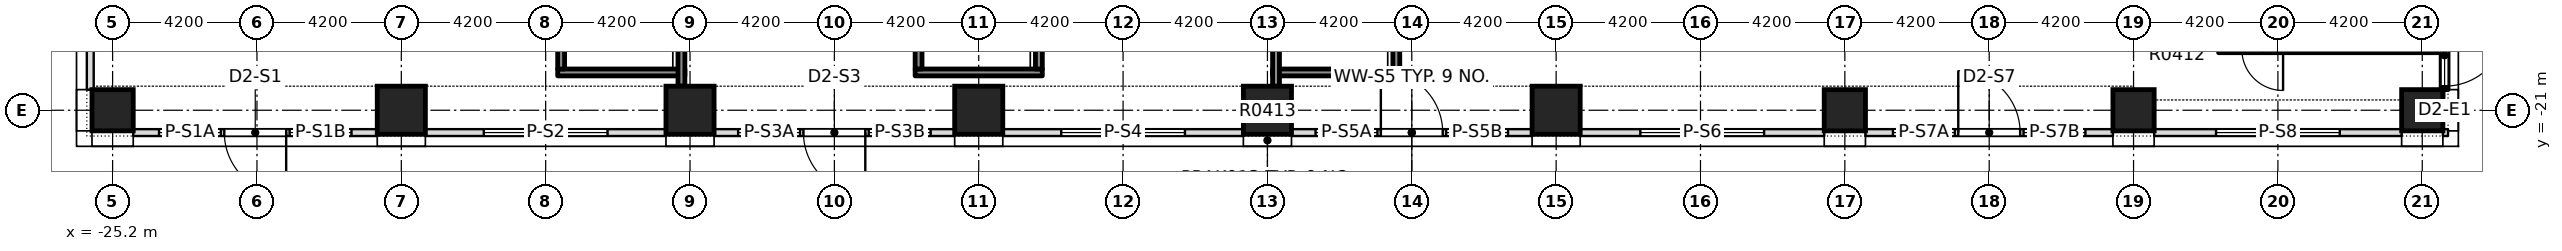
"""IFC4 building model, lengths in metres.
Left out: names, types, materials, properties, quantities, classifications, styles, units other than length and angle.
Written with IfcOpenShell. Run it as: python <this file> out.ifc"""

import sys

from ifc_helpers import new_model, si_unit, direction, frame, frame_2d, origin, origin_2d, place, context, subcontext, project, spatial, rectangle, extrude, element, fill, save


model = new_model("IFC4")
c1 = context("Model", 3, precision=1e-05, world=origin(), true_north=direction((0.0, 1.0)))
c2 = subcontext(c1, "Body", "Model", "MODEL_VIEW")
j1 = project(units=[si_unit("LENGTHUNIT", "METRE"), si_unit("PLANEANGLEUNIT", "RADIAN")], contexts=[c1])
p1 = place(None, origin())
s1 = spatial("IfcSite", under=j1, at=p1, CompositionType="ELEMENT")
p2 = place(p1, origin())
s2 = spatial("IfcBuilding", under=s1, at=p2, CompositionType="ELEMENT")
p3 = place(p2, frame((0.0, 0.0, 25.0)))
s3 = spatial("IfcBuildingStorey", under=s2, at=p3, CompositionType="ELEMENT", Elevation=25.0)
for number, where, z_axis, x_axis in (
    (1, (-16.8, -21.0, -0.4), (0.0, 0.0, 1.0), (1.0, 0.0, 0.0)),
    (2, (-8.4, -21.0, -0.4), (0.0, 0.0, 1.0), (1.0, 0.0, 0.0)),
    (3, (0.0, -21.0, -0.4), (0.0, 0.0, 1.0), (1.0, 0.0, 0.0)),
    (4, (8.4, -21.0, -0.4), (0.0, 0.0, 1.0), (1.0, 0.0, 0.0)),
    (5, (16.8, -21.0, -0.4), (0.0, 0.0, 1.0), (1.0, 0.0, 0.0)),
):
    element("IfcColumn", number, at=place(p3, frame(where, z_axis=z_axis, x_axis=x_axis)), inside=s3, PredefinedType="COLUMN", context=c2, shape_type="SweptSolid", body=[
        extrude(rectangle(XDim=1.4, YDim=1.4, at=origin_2d()), origin(), (0.0, 0.0, 1.0), 5.0),
    ])
for number, where, z_axis, x_axis in (
    (6, (-25.2, -21.0, 0.0), (0.0, 0.0, 1.0), (1.0, 0.0, 0.0)),
    (7, (25.2, -21.0, 0.0), (0.0, 0.0, 1.0), (1.0, 0.0, 0.0)),
    (8, (33.6, -21.0, 0.0), (0.0, 0.0, 1.0), (1.0, 0.0, 0.0)),
    (9, (42.0, -21.0, 0.0), (0.0, 0.0, 1.0), (1.0, 0.0, 0.0)),
):
    element("IfcColumn", number, at=place(p3, frame(where, z_axis=z_axis, x_axis=x_axis)), inside=s3, PredefinedType="COLUMN", context=c2, shape_type="SweptSolid", body=[
        extrude(rectangle(XDim=1.2, YDim=1.2, at=origin_2d()), origin(), (0.0, 0.0, 1.0), 5.0),
    ])
p4 = place(p3, frame((36.075, -19.225, 0.0), z_axis=(0.0, 0.0, 1.0), x_axis=(1.0, 0.0, 0.0)))
e10 = element("IfcWall", 10, at=p4, inside=s3, PredefinedType="SOLIDWALL", context=c2, shape_type="SweptSolid", body=[
    extrude(rectangle(XDim=6.475, YDim=0.2, at=frame_2d((3.238, 0.0))), origin(), (0.0, 0.0, 1.0), 4.6),
])
p5 = place(p4, frame((0.675, 0.0, 0.0)))
e11 = element("IfcOpeningElement", 11, at=p5, cuts=e10, PredefinedType="OPENING", context=c2, shape_type="SweptSolid", body=[
    extrude(rectangle(XDim=1.2, YDim=2.1, at=frame_2d((0.6, 1.05))), frame((0.0, 0.11, 0.0), z_axis=(0.0, -1.0, 0.0), x_axis=(1.0, 0.0, 0.0)), (0.0, 0.0, 1.0), 0.22),
])
p6 = place(p3, frame((-24.6, -21.65, 0.0), z_axis=(0.0, 0.0, 1.0), x_axis=(1.0, 0.0, 0.0)))
e12 = element("IfcWall", 12, at=p6, inside=s3, PredefinedType="STANDARD", context=c2, shape_type="SweptSolid", body=[
    extrude(rectangle(XDim=7.1, YDim=0.2, at=frame_2d((3.55, 0.0))), origin(), (0.0, 0.0, 1.0), 4.6),
])
p7 = place(p6, frame((0.75, 0.0, 0.9)))
e13 = element("IfcOpeningElement", 13, at=p7, cuts=e12, PredefinedType="OPENING", context=c2, shape_type="SweptSolid", body=[
    extrude(rectangle(XDim=1.8, YDim=2.8, at=frame_2d((0.9, 1.4))), frame((0.0, 0.11, 0.0), z_axis=(0.0, -1.0, 0.0), x_axis=(1.0, 0.0, 0.0)), (0.0, 0.0, 1.0), 0.22),
])
p8 = place(p6, frame((2.65, 0.0, 0.0)))
e14 = element("IfcOpeningElement", 14, at=p8, cuts=e12, PredefinedType="OPENING", context=c2, shape_type="SweptSolid", body=[
    extrude(rectangle(XDim=1.8, YDim=2.4, at=frame_2d((0.9, 1.2))), frame((0.0, 0.11, 0.0), z_axis=(0.0, -1.0, 0.0), x_axis=(1.0, 0.0, 0.0)), (0.0, 0.0, 1.0), 0.22),
])
p9 = place(p6, frame((4.55, 0.0, 0.9)))
e15 = element("IfcOpeningElement", 15, at=p9, cuts=e12, PredefinedType="OPENING", context=c2, shape_type="SweptSolid", body=[
    extrude(rectangle(XDim=1.8, YDim=2.8, at=frame_2d((0.9, 1.4))), frame((0.0, 0.11, 0.0), z_axis=(0.0, -1.0, 0.0), x_axis=(1.0, 0.0, 0.0)), (0.0, 0.0, 1.0), 0.22),
])
p10 = place(p3, frame((-16.1, -21.65, 0.0), z_axis=(0.0, 0.0, 1.0), x_axis=(1.0, 0.0, 0.0)))
e16 = element("IfcWall", 16, at=p10, inside=s3, PredefinedType="STANDARD", context=c2, shape_type="SweptSolid", body=[
    extrude(rectangle(XDim=7.0, YDim=0.2, at=frame_2d((3.5, 0.0))), origin(), (0.0, 0.0, 1.0), 4.6),
])
p11 = place(p10, frame((1.7, 0.0, 0.9)))
e17 = element("IfcOpeningElement", 17, at=p11, cuts=e16, PredefinedType="OPENING", context=c2, shape_type="SweptSolid", body=[
    extrude(rectangle(XDim=3.6, YDim=2.8, at=frame_2d((1.8, 1.4))), frame((0.0, 0.11, 0.0), z_axis=(0.0, -1.0, 0.0), x_axis=(1.0, 0.0, 0.0)), (0.0, 0.0, 1.0), 0.22),
])
p12 = place(p3, frame((-7.7, -21.65, 0.0), z_axis=(0.0, 0.0, 1.0), x_axis=(1.0, 0.0, 0.0)))
e18 = element("IfcWall", 18, at=p12, inside=s3, PredefinedType="STANDARD", context=c2, shape_type="SweptSolid", body=[
    extrude(rectangle(XDim=7.0, YDim=0.2, at=frame_2d((3.5, 0.0))), origin(), (0.0, 0.0, 1.0), 4.6),
])
p13 = place(p12, frame((0.7, 0.0, 0.9)))
e19 = element("IfcOpeningElement", 19, at=p13, cuts=e18, PredefinedType="OPENING", context=c2, shape_type="SweptSolid", body=[
    extrude(rectangle(XDim=1.8, YDim=2.8, at=frame_2d((0.9, 1.4))), frame((0.0, 0.11, 0.0), z_axis=(0.0, -1.0, 0.0), x_axis=(1.0, 0.0, 0.0)), (0.0, 0.0, 1.0), 0.22),
])
p14 = place(p12, frame((2.6, 0.0, 0.0)))
e20 = element("IfcOpeningElement", 20, at=p14, cuts=e18, PredefinedType="OPENING", context=c2, shape_type="SweptSolid", body=[
    extrude(rectangle(XDim=1.8, YDim=2.4, at=frame_2d((0.9, 1.2))), frame((0.0, 0.11, 0.0), z_axis=(0.0, -1.0, 0.0), x_axis=(1.0, 0.0, 0.0)), (0.0, 0.0, 1.0), 0.22),
])
p15 = place(p12, frame((4.5, 0.0, 0.9)))
e21 = element("IfcOpeningElement", 21, at=p15, cuts=e18, PredefinedType="OPENING", context=c2, shape_type="SweptSolid", body=[
    extrude(rectangle(XDim=1.8, YDim=2.8, at=frame_2d((0.9, 1.4))), frame((0.0, 0.11, 0.0), z_axis=(0.0, -1.0, 0.0), x_axis=(1.0, 0.0, 0.0)), (0.0, 0.0, 1.0), 0.22),
])
p16 = place(p3, frame((0.7, -21.65, 0.0), z_axis=(0.0, 0.0, 1.0), x_axis=(1.0, 0.0, 0.0)))
e22 = element("IfcWall", 22, at=p16, inside=s3, PredefinedType="STANDARD", context=c2, shape_type="SweptSolid", body=[
    extrude(rectangle(XDim=7.0, YDim=0.2, at=frame_2d((3.5, 0.0))), origin(), (0.0, 0.0, 1.0), 4.6),
])
p17 = place(p16, frame((1.7, 0.0, 0.9)))
e23 = element("IfcOpeningElement", 23, at=p17, cuts=e22, PredefinedType="OPENING", context=c2, shape_type="SweptSolid", body=[
    extrude(rectangle(XDim=3.6, YDim=2.8, at=frame_2d((1.8, 1.4))), frame((0.0, 0.11, 0.0), z_axis=(0.0, -1.0, 0.0), x_axis=(1.0, 0.0, 0.0)), (0.0, 0.0, 1.0), 0.22),
])
p18 = place(p3, frame((9.1, -21.65, 0.0), z_axis=(0.0, 0.0, 1.0), x_axis=(1.0, 0.0, 0.0)))
e24 = element("IfcWall", 24, at=p18, inside=s3, PredefinedType="STANDARD", context=c2, shape_type="SweptSolid", body=[
    extrude(rectangle(XDim=7.0, YDim=0.2, at=frame_2d((3.5, 0.0))), origin(), (0.0, 0.0, 1.0), 4.6),
])
p19 = place(p18, frame((0.7, 0.0, 0.9)))
e25 = element("IfcOpeningElement", 25, at=p19, cuts=e24, PredefinedType="OPENING", context=c2, shape_type="SweptSolid", body=[
    extrude(rectangle(XDim=1.8, YDim=2.8, at=frame_2d((0.9, 1.4))), frame((0.0, 0.11, 0.0), z_axis=(0.0, -1.0, 0.0), x_axis=(1.0, 0.0, 0.0)), (0.0, 0.0, 1.0), 0.22),
])
p20 = place(p18, frame((2.6, 0.0, 0.0)))
e26 = element("IfcOpeningElement", 26, at=p20, cuts=e24, PredefinedType="OPENING", context=c2, shape_type="SweptSolid", body=[
    extrude(rectangle(XDim=1.8, YDim=2.4, at=frame_2d((0.9, 1.2))), frame((0.0, 0.11, 0.0), z_axis=(0.0, -1.0, 0.0), x_axis=(1.0, 0.0, 0.0)), (0.0, 0.0, 1.0), 0.22),
])
p21 = place(p18, frame((4.5, 0.0, 0.9)))
e27 = element("IfcOpeningElement", 27, at=p21, cuts=e24, PredefinedType="OPENING", context=c2, shape_type="SweptSolid", body=[
    extrude(rectangle(XDim=1.8, YDim=2.8, at=frame_2d((0.9, 1.4))), frame((0.0, 0.11, 0.0), z_axis=(0.0, -1.0, 0.0), x_axis=(1.0, 0.0, 0.0)), (0.0, 0.0, 1.0), 0.22),
])
p22 = place(p3, frame((17.5, -21.65, 0.0), z_axis=(0.0, 0.0, 1.0), x_axis=(1.0, 0.0, 0.0)))
e28 = element("IfcWall", 28, at=p22, inside=s3, PredefinedType="STANDARD", context=c2, shape_type="SweptSolid", body=[
    extrude(rectangle(XDim=7.1, YDim=0.2, at=frame_2d((3.55, 0.0))), origin(), (0.0, 0.0, 1.0), 4.6),
])
p23 = place(p22, frame((1.75, 0.0, 0.9)))
e29 = element("IfcOpeningElement", 29, at=p23, cuts=e28, PredefinedType="OPENING", context=c2, shape_type="SweptSolid", body=[
    extrude(rectangle(XDim=3.6, YDim=2.8, at=frame_2d((1.8, 1.4))), frame((0.0, 0.11, 0.0), z_axis=(0.0, -1.0, 0.0), x_axis=(1.0, 0.0, 0.0)), (0.0, 0.0, 1.0), 0.22),
])
p24 = place(p3, frame((25.8, -21.65, 0.0), z_axis=(0.0, 0.0, 1.0), x_axis=(1.0, 0.0, 0.0)))
e30 = element("IfcWall", 30, at=p24, inside=s3, PredefinedType="STANDARD", context=c2, shape_type="SweptSolid", body=[
    extrude(rectangle(XDim=7.2, YDim=0.2, at=frame_2d((3.6, 0.0))), origin(), (0.0, 0.0, 1.0), 4.6),
])
p25 = place(p24, frame((0.8, 0.0, 0.9)))
e31 = element("IfcOpeningElement", 31, at=p25, cuts=e30, PredefinedType="OPENING", context=c2, shape_type="SweptSolid", body=[
    extrude(rectangle(XDim=1.8, YDim=2.8, at=frame_2d((0.9, 1.4))), frame((0.0, 0.11, 0.0), z_axis=(0.0, -1.0, 0.0), x_axis=(1.0, 0.0, 0.0)), (0.0, 0.0, 1.0), 0.22),
])
p26 = place(p24, frame((2.7, 0.0, 0.0)))
e32 = element("IfcOpeningElement", 32, at=p26, cuts=e30, PredefinedType="OPENING", context=c2, shape_type="SweptSolid", body=[
    extrude(rectangle(XDim=1.8, YDim=2.4, at=frame_2d((0.9, 1.2))), frame((0.0, 0.11, 0.0), z_axis=(0.0, -1.0, 0.0), x_axis=(1.0, 0.0, 0.0)), (0.0, 0.0, 1.0), 0.22),
])
p27 = place(p24, frame((4.6, 0.0, 0.9)))
e33 = element("IfcOpeningElement", 33, at=p27, cuts=e30, PredefinedType="OPENING", context=c2, shape_type="SweptSolid", body=[
    extrude(rectangle(XDim=1.8, YDim=2.8, at=frame_2d((0.9, 1.4))), frame((0.0, 0.11, 0.0), z_axis=(0.0, -1.0, 0.0), x_axis=(1.0, 0.0, 0.0)), (0.0, 0.0, 1.0), 0.22),
])
p28 = place(p3, frame((34.2, -21.65, 0.0), z_axis=(0.0, 0.0, 1.0), x_axis=(1.0, 0.0, 0.0)))
e34 = element("IfcWall", 34, at=p28, inside=s3, PredefinedType="STANDARD", context=c2, shape_type="SweptSolid", body=[
    extrude(rectangle(XDim=7.2, YDim=0.2, at=frame_2d((3.6, 0.0))), origin(), (0.0, 0.0, 1.0), 4.6),
])
p29 = place(p28, frame((1.8, 0.0, 0.9)))
e35 = element("IfcOpeningElement", 35, at=p29, cuts=e34, PredefinedType="OPENING", context=c2, shape_type="SweptSolid", body=[
    extrude(rectangle(XDim=3.6, YDim=2.8, at=frame_2d((1.8, 1.4))), frame((0.0, 0.11, 0.0), z_axis=(0.0, -1.0, 0.0), x_axis=(1.0, 0.0, 0.0)), (0.0, 0.0, 1.0), 0.22),
])
p30 = place(p3, frame((42.6, -21.65, 0.0), z_axis=(0.0, 0.0, 1.0), x_axis=(1.0, 0.0, 0.0)))
e36 = element("IfcWall", 36, at=p30, inside=s3, PredefinedType="STANDARD", context=c2, shape_type="SweptSolid", body=[
    extrude(rectangle(XDim=0.15, YDim=0.2, at=frame_2d((0.075, 0.0))), origin(), (0.0, 0.0, 1.0), 4.6),
])
p31 = place(p3, frame((42.65, -20.4, 0.0), z_axis=(0.0, 0.0, 1.0), x_axis=(0.0, 1.0, 0.0)))
e37 = element("IfcWall", 37, at=p31, inside=s3, PredefinedType="SOLIDWALL", context=c2, shape_type="SweptSolid", body=[
    extrude(rectangle(XDim=7.2, YDim=0.2, at=frame_2d((3.6, 0.0))), origin(), (0.0, 0.0, 1.0), 4.6),
])
p32 = place(p31, frame((2.0, 0.0, 0.9)))
e38 = element("IfcOpeningElement", 38, at=p32, cuts=e37, PredefinedType="OPENING", context=c2, shape_type="SweptSolid", body=[
    extrude(rectangle(XDim=1.8, YDim=2.8, at=frame_2d((0.9, 1.4))), frame((0.0, 0.11, 0.0), z_axis=(0.0, -1.0, 0.0), x_axis=(1.0, 0.0, 0.0)), (0.0, 0.0, 1.0), 0.22),
])
p33 = place(p31, frame((0.1, 0.0, 0.0)))
e39 = element("IfcOpeningElement", 39, at=p33, cuts=e37, PredefinedType="OPENING", context=c2, shape_type="SweptSolid", body=[
    extrude(rectangle(XDim=1.8, YDim=2.4, at=frame_2d((0.9, 1.2))), frame((0.0, 0.11, 0.0), z_axis=(0.0, -1.0, 0.0), x_axis=(1.0, 0.0, 0.0)), (0.0, 0.0, 1.0), 0.22),
])
p34 = place(p31, frame((3.9, 0.0, 0.9)))
e40 = element("IfcOpeningElement", 40, at=p34, cuts=e37, PredefinedType="OPENING", context=c2, shape_type="SweptSolid", body=[
    extrude(rectangle(XDim=1.8, YDim=2.8, at=frame_2d((0.9, 1.4))), frame((0.0, 0.11, 0.0), z_axis=(0.0, -1.0, 0.0), x_axis=(1.0, 0.0, 0.0)), (0.0, 0.0, 1.0), 0.22),
])
p35 = place(p3, frame((-25.85, -13.3, 0.0), z_axis=(0.0, 0.0, 1.0), x_axis=(0.0, -1.0, 0.0)))
e41 = element("IfcWall", 41, at=p35, inside=s3, PredefinedType="STANDARD", context=c2, shape_type="SweptSolid", body=[
    extrude(rectangle(XDim=7.1, YDim=0.2, at=frame_2d((3.55, 0.0))), origin(), (0.0, 0.0, 1.0), 4.6),
])
p36 = place(p35, frame((1.75, 0.0, 0.9)))
e42 = element("IfcOpeningElement", 42, at=p36, cuts=e41, PredefinedType="OPENING", context=c2, shape_type="SweptSolid", body=[
    extrude(rectangle(XDim=3.6, YDim=2.8, at=frame_2d((1.8, 1.4))), frame((0.0, 0.11, 0.0), z_axis=(0.0, -1.0, 0.0), x_axis=(1.0, 0.0, 0.0)), (0.0, 0.0, 1.0), 0.22),
])
p37 = place(p3, frame((-12.25, -19.9, 0.0), z_axis=(0.0, 0.0, 1.0), x_axis=(1.0, 0.0, 0.0)))
e43 = element("IfcWall", 43, at=p37, inside=s3, PredefinedType="SOLIDWALL", context=c2, shape_type="SweptSolid", body=[
    extrude(rectangle(XDim=3.7, YDim=0.2, at=frame_2d((1.85, 0.0))), origin(), (0.0, 0.0, 1.0), 4.6),
])
p38 = place(p3, frame((-12.15, -19.8, 0.0), z_axis=(0.0, 0.0, 1.0), x_axis=(0.0, 1.0, 0.0)))
e44 = element("IfcWall", 44, at=p38, inside=s3, PredefinedType="SOLIDWALL", context=c2, shape_type="SweptSolid", body=[
    extrude(rectangle(XDim=6.6, YDim=0.2, at=frame_2d((3.3, 0.0))), origin(), (0.0, 0.0, 1.0), 4.6),
])
p39 = place(p3, frame((-8.65, -20.3, 0.0), z_axis=(0.0, 0.0, 1.0), x_axis=(0.0, 1.0, 0.0)))
e45 = element("IfcWall", 45, at=p39, inside=s3, PredefinedType="SOLIDWALL", context=c2, shape_type="SweptSolid", body=[
    extrude(rectangle(XDim=7.1, YDim=0.2, at=frame_2d((3.55, 0.0))), origin(), (0.0, 0.0, 1.0), 4.6),
])
p40 = place(p3, frame((-1.85, -19.9, 0.0), z_axis=(0.0, 0.0, 1.0), x_axis=(1.0, 0.0, 0.0)))
e46 = element("IfcWall", 46, at=p40, inside=s3, PredefinedType="SOLIDWALL", context=c2, shape_type="SweptSolid", body=[
    extrude(rectangle(XDim=3.7, YDim=0.2, at=frame_2d((1.85, 0.0))), origin(), (0.0, 0.0, 1.0), 4.6),
])
for number, where, z_axis, x_axis in (
    (47, (-1.75, -19.8, 0.0), (0.0, 0.0, 1.0), (0.0, 1.0, 0.0)),
    (48, (1.75, -19.8, 0.0), (0.0, 0.0, 1.0), (0.0, 1.0, 0.0)),
):
    element("IfcWall", number, at=place(p3, frame(where, z_axis=z_axis, x_axis=x_axis)), inside=s3, PredefinedType="SOLIDWALL", context=c2, shape_type="SweptSolid", body=[
        extrude(rectangle(XDim=6.6, YDim=0.2, at=frame_2d((3.3, 0.0))), origin(), (0.0, 0.0, 1.0), 4.6),
    ])
p41 = place(p3, frame((8.55, -19.9, 0.0), z_axis=(0.0, 0.0, 1.0), x_axis=(1.0, 0.0, 0.0)))
e49 = element("IfcWall", 49, at=p41, inside=s3, PredefinedType="SOLIDWALL", context=c2, shape_type="SweptSolid", body=[
    extrude(rectangle(XDim=3.7, YDim=0.2, at=frame_2d((1.85, 0.0))), origin(), (0.0, 0.0, 1.0), 4.6),
])
p42 = place(p3, frame((8.65, -20.3, 0.0), z_axis=(0.0, 0.0, 1.0), x_axis=(0.0, 1.0, 0.0)))
e50 = element("IfcWall", 50, at=p42, inside=s3, PredefinedType="SOLIDWALL", context=c2, shape_type="SweptSolid", body=[
    extrude(rectangle(XDim=7.1, YDim=0.2, at=frame_2d((3.55, 0.0))), origin(), (0.0, 0.0, 1.0), 4.6),
])
p43 = place(p3, frame((12.15, -19.8, 0.0), z_axis=(0.0, 0.0, 1.0), x_axis=(0.0, 1.0, 0.0)))
e51 = element("IfcWall", 51, at=p43, inside=s3, PredefinedType="SOLIDWALL", context=c2, shape_type="SweptSolid", body=[
    extrude(rectangle(XDim=6.6, YDim=0.2, at=frame_2d((3.3, 0.0))), origin(), (0.0, 0.0, 1.0), 4.6),
])
p44 = place(p7, origin())
e52 = element("IfcWindow", 52, at=p44, inside=s3, PartitioningType="SINGLE_PANEL", PredefinedType="WINDOW", context=c2, shape_type="SweptSolid", body=[
    extrude(rectangle(XDim=1.8, YDim=2.8, at=frame_2d((0.9, 1.4))), frame((0.0, 0.03, 0.0), z_axis=(0.0, -1.0, 0.0), x_axis=(1.0, 0.0, 0.0)), (0.0, 0.0, 1.0), 0.06),
])
fill(e13, e52)
p45 = place(p8, origin())
e53 = element("IfcDoor", 53, at=p45, inside=s3, OperationType="SINGLE_SWING_LEFT", PredefinedType="DOOR", context=c2, shape_type="SweptSolid", body=[
    extrude(rectangle(XDim=1.8, YDim=2.4, at=frame_2d((0.9, 1.2))), frame((0.0, 0.025, 0.0), z_axis=(0.0, -1.0, 0.0), x_axis=(1.0, 0.0, 0.0)), (0.0, 0.0, 1.0), 0.05),
])
fill(e14, e53)
p46 = place(p9, origin())
e54 = element("IfcWindow", 54, at=p46, inside=s3, PartitioningType="SINGLE_PANEL", PredefinedType="WINDOW", context=c2, shape_type="SweptSolid", body=[
    extrude(rectangle(XDim=1.8, YDim=2.8, at=frame_2d((0.9, 1.4))), frame((0.0, 0.03, 0.0), z_axis=(0.0, -1.0, 0.0), x_axis=(1.0, 0.0, 0.0)), (0.0, 0.0, 1.0), 0.06),
])
fill(e15, e54)
p47 = place(p11, origin())
e55 = element("IfcWindow", 55, at=p47, inside=s3, PartitioningType="SINGLE_PANEL", PredefinedType="WINDOW", context=c2, shape_type="SweptSolid", body=[
    extrude(rectangle(XDim=3.6, YDim=2.8, at=frame_2d((1.8, 1.4))), frame((0.0, 0.03, 0.0), z_axis=(0.0, -1.0, 0.0), x_axis=(1.0, 0.0, 0.0)), (0.0, 0.0, 1.0), 0.06),
])
fill(e17, e55)
p48 = place(p13, origin())
e56 = element("IfcWindow", 56, at=p48, inside=s3, PartitioningType="SINGLE_PANEL", PredefinedType="WINDOW", context=c2, shape_type="SweptSolid", body=[
    extrude(rectangle(XDim=1.8, YDim=2.8, at=frame_2d((0.9, 1.4))), frame((0.0, 0.03, 0.0), z_axis=(0.0, -1.0, 0.0), x_axis=(1.0, 0.0, 0.0)), (0.0, 0.0, 1.0), 0.06),
])
fill(e19, e56)
p49 = place(p14, origin())
e57 = element("IfcDoor", 57, at=p49, inside=s3, OperationType="SINGLE_SWING_LEFT", PredefinedType="DOOR", context=c2, shape_type="SweptSolid", body=[
    extrude(rectangle(XDim=1.8, YDim=2.4, at=frame_2d((0.9, 1.2))), frame((0.0, 0.025, 0.0), z_axis=(0.0, -1.0, 0.0), x_axis=(1.0, 0.0, 0.0)), (0.0, 0.0, 1.0), 0.05),
])
fill(e20, e57)
p50 = place(p15, origin())
e58 = element("IfcWindow", 58, at=p50, inside=s3, PartitioningType="SINGLE_PANEL", PredefinedType="WINDOW", context=c2, shape_type="SweptSolid", body=[
    extrude(rectangle(XDim=1.8, YDim=2.8, at=frame_2d((0.9, 1.4))), frame((0.0, 0.03, 0.0), z_axis=(0.0, -1.0, 0.0), x_axis=(1.0, 0.0, 0.0)), (0.0, 0.0, 1.0), 0.06),
])
fill(e21, e58)
p51 = place(p17, origin())
e59 = element("IfcWindow", 59, at=p51, inside=s3, PartitioningType="SINGLE_PANEL", PredefinedType="WINDOW", context=c2, shape_type="SweptSolid", body=[
    extrude(rectangle(XDim=3.6, YDim=2.8, at=frame_2d((1.8, 1.4))), frame((0.0, 0.03, 0.0), z_axis=(0.0, -1.0, 0.0), x_axis=(1.0, 0.0, 0.0)), (0.0, 0.0, 1.0), 0.06),
])
fill(e23, e59)
p52 = place(p19, origin())
e60 = element("IfcWindow", 60, at=p52, inside=s3, PartitioningType="SINGLE_PANEL", PredefinedType="WINDOW", context=c2, shape_type="SweptSolid", body=[
    extrude(rectangle(XDim=1.8, YDim=2.8, at=frame_2d((0.9, 1.4))), frame((0.0, 0.03, 0.0), z_axis=(0.0, -1.0, 0.0), x_axis=(1.0, 0.0, 0.0)), (0.0, 0.0, 1.0), 0.06),
])
fill(e25, e60)
p53 = place(p20, origin())
e61 = element("IfcDoor", 61, at=p53, inside=s3, OperationType="SINGLE_SWING_LEFT", PredefinedType="DOOR", context=c2, shape_type="SweptSolid", body=[
    extrude(rectangle(XDim=1.8, YDim=2.4, at=frame_2d((0.9, 1.2))), frame((0.0, 0.025, 0.0), z_axis=(0.0, -1.0, 0.0), x_axis=(1.0, 0.0, 0.0)), (0.0, 0.0, 1.0), 0.05),
])
fill(e26, e61)
p54 = place(p21, origin())
e62 = element("IfcWindow", 62, at=p54, inside=s3, PartitioningType="SINGLE_PANEL", PredefinedType="WINDOW", context=c2, shape_type="SweptSolid", body=[
    extrude(rectangle(XDim=1.8, YDim=2.8, at=frame_2d((0.9, 1.4))), frame((0.0, 0.03, 0.0), z_axis=(0.0, -1.0, 0.0), x_axis=(1.0, 0.0, 0.0)), (0.0, 0.0, 1.0), 0.06),
])
fill(e27, e62)
p55 = place(p23, origin())
e63 = element("IfcWindow", 63, at=p55, inside=s3, PartitioningType="SINGLE_PANEL", PredefinedType="WINDOW", context=c2, shape_type="SweptSolid", body=[
    extrude(rectangle(XDim=3.6, YDim=2.8, at=frame_2d((1.8, 1.4))), frame((0.0, 0.03, 0.0), z_axis=(0.0, -1.0, 0.0), x_axis=(1.0, 0.0, 0.0)), (0.0, 0.0, 1.0), 0.06),
])
fill(e29, e63)
p56 = place(p25, origin())
e64 = element("IfcWindow", 64, at=p56, inside=s3, PartitioningType="SINGLE_PANEL", PredefinedType="WINDOW", context=c2, shape_type="SweptSolid", body=[
    extrude(rectangle(XDim=1.8, YDim=2.8, at=frame_2d((0.9, 1.4))), frame((0.0, 0.03, 0.0), z_axis=(0.0, -1.0, 0.0), x_axis=(1.0, 0.0, 0.0)), (0.0, 0.0, 1.0), 0.06),
])
fill(e31, e64)
p57 = place(p26, origin())
e65 = element("IfcDoor", 65, at=p57, inside=s3, OperationType="SINGLE_SWING_LEFT", PredefinedType="DOOR", context=c2, shape_type="SweptSolid", body=[
    extrude(rectangle(XDim=1.8, YDim=2.4, at=frame_2d((0.9, 1.2))), frame((0.0, 0.025, 0.0), z_axis=(0.0, -1.0, 0.0), x_axis=(1.0, 0.0, 0.0)), (0.0, 0.0, 1.0), 0.05),
])
fill(e32, e65)
p58 = place(p27, origin())
e66 = element("IfcWindow", 66, at=p58, inside=s3, PartitioningType="SINGLE_PANEL", PredefinedType="WINDOW", context=c2, shape_type="SweptSolid", body=[
    extrude(rectangle(XDim=1.8, YDim=2.8, at=frame_2d((0.9, 1.4))), frame((0.0, 0.03, 0.0), z_axis=(0.0, -1.0, 0.0), x_axis=(1.0, 0.0, 0.0)), (0.0, 0.0, 1.0), 0.06),
])
fill(e33, e66)
p59 = place(p29, origin())
e67 = element("IfcWindow", 67, at=p59, inside=s3, PartitioningType="SINGLE_PANEL", PredefinedType="WINDOW", context=c2, shape_type="SweptSolid", body=[
    extrude(rectangle(XDim=3.6, YDim=2.8, at=frame_2d((1.8, 1.4))), frame((0.0, 0.03, 0.0), z_axis=(0.0, -1.0, 0.0), x_axis=(1.0, 0.0, 0.0)), (0.0, 0.0, 1.0), 0.06),
])
fill(e35, e67)
p60 = place(p33, origin())
e68 = element("IfcDoor", 68, at=p60, inside=s3, OperationType="SINGLE_SWING_LEFT", PredefinedType="DOOR", context=c2, shape_type="SweptSolid", body=[
    extrude(rectangle(XDim=1.8, YDim=2.4, at=frame_2d((0.9, 1.2))), frame((0.0, 0.025, 0.0), z_axis=(0.0, -1.0, 0.0), x_axis=(1.0, 0.0, 0.0)), (0.0, 0.0, 1.0), 0.05),
])
fill(e39, e68)
save(model, sys.argv[1])
